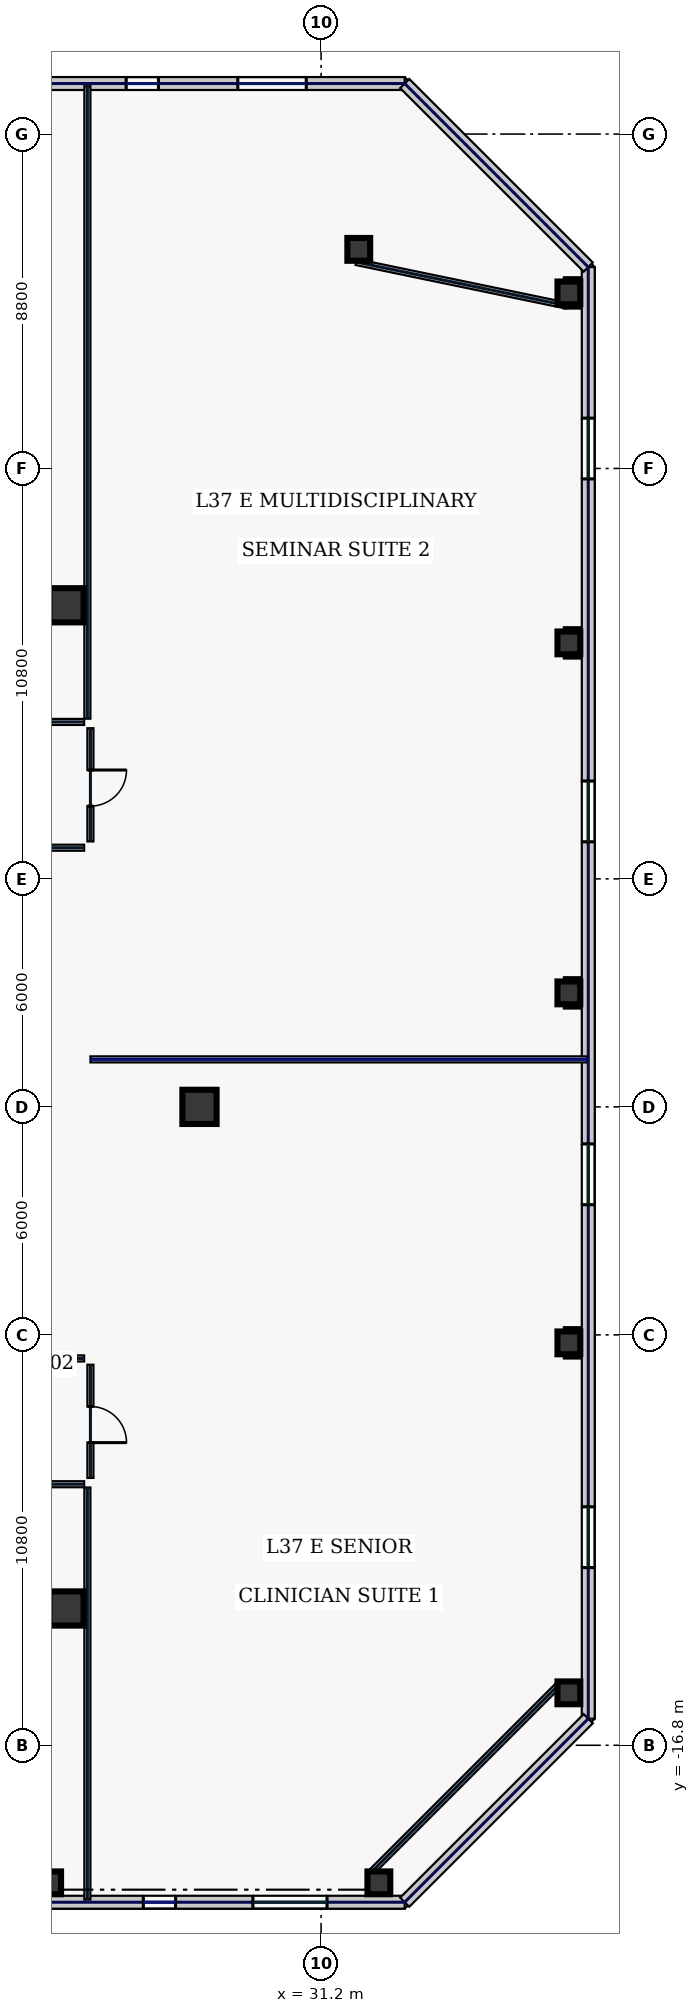
"""IFC4 building model, lengths in metres.
Left out: names, types, materials, properties, quantities, classifications, styles, units other than length and angle.
Written with IfcOpenShell. Run it as: python <this file> out.ifc"""

import sys

from ifc_helpers import new_model, si_unit, direction, frame, frame_2d, origin, origin_2d, place, context, subcontext, project, spatial, rectangle, hollow_rectangle, extrude, element, fill, save


model = new_model("IFC4")
c1 = context("Model", 3, precision=1e-05, world=origin(), true_north=direction((0.0, 1.0)))
c2 = subcontext(c1, "Body", "Model", "MODEL_VIEW")
j1 = project(units=[si_unit("LENGTHUNIT", "METRE"), si_unit("PLANEANGLEUNIT", "RADIAN")], contexts=[c1])
p1 = place(None, origin())
s1 = spatial("IfcSite", under=j1, at=p1, CompositionType="ELEMENT")
p2 = place(p1, origin())
s2 = spatial("IfcBuilding", under=s1, at=p2, CompositionType="ELEMENT")
p3 = place(p2, frame((0.0, 0.0, 164.2)))
s3 = spatial("IfcBuildingStorey", under=s2, at=p3, CompositionType="ELEMENT", Elevation=164.2)
for number, where, z_axis, x_axis in (
    (1, (24.5, -13.2, 0.0), (0.0, 0.0, 1.0), (1.0, 0.0, 0.0)),
    (2, (24.5, 13.2, 0.0), (0.0, 0.0, 1.0), (1.0, 0.0, 0.0)),
    (3, (28.0, 0.0, 0.0), (0.0, 0.0, 1.0), (1.0, 0.0, 0.0)),
):
    element("IfcColumn", number, at=place(p3, frame(where, z_axis=z_axis, x_axis=x_axis)), inside=s3, PredefinedType="COLUMN", context=c2, shape_type="SweptSolid", body=[
        extrude(hollow_rectangle(XDim=0.9, YDim=0.9, WallThickness=0.04, at=origin_2d()), origin(), (0.0, 0.0, 1.0), 3.74),
    ])
for number, where, z_axis, x_axis in (
    (4, (24.057, -20.42, 0.0), (0.0, 0.0, 1.0), (1.0, 0.0, 0.0)),
    (5, (32.72, -20.42, 0.0), (0.0, 0.0, 1.0), (1.0, 0.0, 0.0)),
    (6, (32.191, 22.566, 0.0), (0.0, 0.0, 1.0), (1.0, 0.0, 0.0)),
    (7, (37.72, -15.42, 0.0), (0.0, 0.0, 1.0), (1.0, 0.0, 0.0)),
    (8, (37.72, -6.21, 0.0), (0.0, 0.0, 1.0), (1.0, 0.0, 0.0)),
    (9, (37.72, 3.0, 0.0), (0.0, 0.0, 1.0), (1.0, 0.0, 0.0)),
    (10, (37.72, 12.21, 0.0), (0.0, 0.0, 1.0), (1.0, 0.0, 0.0)),
    (11, (37.72, 21.42, 0.0), (0.0, 0.0, 1.0), (1.0, 0.0, 0.0)),
):
    element("IfcColumn", number, at=place(p3, frame(where, z_axis=z_axis, x_axis=x_axis)), inside=s3, PredefinedType="COLUMN", context=c2, shape_type="SweptSolid", body=[
        extrude(hollow_rectangle(XDim=0.6, YDim=0.6, WallThickness=0.028, at=origin_2d()), origin(), (0.0, 0.0, 1.0), 3.74),
    ])
p4 = place(p3, frame((13.463, -20.93, 0.0), z_axis=(0.0, 0.0, 1.0), x_axis=(1.0, 0.0, 0.0)))
e12 = element("IfcWall", 12, at=p4, inside=s3, PredefinedType="STANDARD", context=c2, shape_type="SweptSolid", body=[
    extrude(rectangle(XDim=19.937, YDim=0.34, at=frame_2d((9.969, 0.0))), origin(), (0.0, 0.0, 1.0), 3.74),
])
p5 = place(p4, frame((3.295, 0.0, 0.8)))
e13 = element("IfcOpeningElement", 13, at=p5, cuts=e12, PredefinedType="OPENING", context=c2, shape_type="SweptSolid", body=[
    extrude(rectangle(XDim=1.95, YDim=2.1, at=frame_2d((0.975, 1.05))), frame((0.0, 0.18, 0.0), z_axis=(0.0, -1.0, 0.0), x_axis=(1.0, 0.0, 0.0)), (0.0, 0.0, 1.0), 0.36),
])
p6 = place(p4, frame((8.38, 0.0, 0.8)))
e14 = element("IfcOpeningElement", 14, at=p6, cuts=e12, PredefinedType="OPENING", context=c2, shape_type="SweptSolid", body=[
    extrude(rectangle(XDim=0.85, YDim=1.85, at=frame_2d((0.425, 0.925))), frame((0.0, 0.18, 0.0), z_axis=(0.0, -1.0, 0.0), x_axis=(1.0, 0.0, 0.0)), (0.0, 0.0, 1.0), 0.36),
])
p7 = place(p4, frame((13.058, 0.0, 0.8)))
e15 = element("IfcOpeningElement", 15, at=p7, cuts=e12, PredefinedType="OPENING", context=c2, shape_type="SweptSolid", body=[
    extrude(rectangle(XDim=0.85, YDim=1.85, at=frame_2d((0.425, 0.925))), frame((0.0, 0.18, 0.0), z_axis=(0.0, -1.0, 0.0), x_axis=(1.0, 0.0, 0.0)), (0.0, 0.0, 1.0), 0.36),
])
p8 = place(p4, frame((15.943, 0.0, 0.8)))
e16 = element("IfcOpeningElement", 16, at=p8, cuts=e12, PredefinedType="OPENING", context=c2, shape_type="SweptSolid", body=[
    extrude(rectangle(XDim=1.95, YDim=2.1, at=frame_2d((0.975, 1.05))), frame((0.0, 0.18, 0.0), z_axis=(0.0, -1.0, 0.0), x_axis=(1.0, 0.0, 0.0)), (0.0, 0.0, 1.0), 0.36),
])
p9 = place(p3, frame((33.4, 26.93, 0.0), z_axis=(0.0, 0.0, 1.0), x_axis=(-1.0, 0.0, 0.0)))
e17 = element("IfcWall", 17, at=p9, inside=s3, PredefinedType="STANDARD", context=c2, shape_type="SweptSolid", body=[
    extrude(rectangle(XDim=20.09, YDim=0.34, at=frame_2d((10.045, 0.0))), origin(), (0.0, 0.0, 1.0), 3.74),
])
p10 = place(p9, frame((15.105, 0.0, 0.22)))
e18 = element("IfcOpeningElement", 18, at=p10, cuts=e17, PredefinedType="OPENING", context=c2, shape_type="SweptSolid", body=[
    extrude(rectangle(XDim=1.6, YDim=1.2, at=frame_2d((0.8, 0.6))), frame((0.0, 0.18, 0.0), z_axis=(0.0, -1.0, 0.0), x_axis=(1.0, 0.0, 0.0)), (0.0, 0.0, 1.0), 0.36),
])
p11 = place(p9, frame((11.071, 0.0, 0.7)))
e19 = element("IfcOpeningElement", 19, at=p11, cuts=e17, PredefinedType="OPENING", context=c2, shape_type="SweptSolid", body=[
    extrude(rectangle(XDim=1.8, YDim=2.2, at=frame_2d((0.9, 1.1))), frame((0.0, 0.18, 0.0), z_axis=(0.0, -1.0, 0.0), x_axis=(1.0, 0.0, 0.0)), (0.0, 0.0, 1.0), 0.36),
])
p12 = place(p9, frame((6.48, 0.0, 0.7)))
e20 = element("IfcOpeningElement", 20, at=p12, cuts=e17, PredefinedType="OPENING", context=c2, shape_type="SweptSolid", body=[
    extrude(rectangle(XDim=0.85, YDim=1.85, at=frame_2d((0.425, 0.925))), frame((0.0, 0.18, 0.0), z_axis=(0.0, -1.0, 0.0), x_axis=(1.0, 0.0, 0.0)), (0.0, 0.0, 1.0), 0.36),
])
p13 = place(p9, frame((2.591, 0.0, 0.7)))
e21 = element("IfcOpeningElement", 21, at=p13, cuts=e17, PredefinedType="OPENING", context=c2, shape_type="SweptSolid", body=[
    extrude(rectangle(XDim=1.8, YDim=2.2, at=frame_2d((0.9, 1.1))), frame((0.0, 0.18, 0.0), z_axis=(0.0, -1.0, 0.0), x_axis=(1.0, 0.0, 0.0)), (0.0, 0.0, 1.0), 0.36),
])
p14 = place(p3, frame((38.23, -16.1, 0.0), z_axis=(0.0, 0.0, 1.0), x_axis=(0.0, 1.0, 0.0)))
e22 = element("IfcWall", 22, at=p14, inside=s3, PredefinedType="STANDARD", context=c2, shape_type="SweptSolid", body=[
    extrude(rectangle(XDim=38.2, YDim=0.34, at=frame_2d((19.1, 0.0))), origin(), (0.0, 0.0, 1.0), 3.74),
])
p15 = place(p14, frame((3.975, 0.0, 0.58)))
e23 = element("IfcOpeningElement", 23, at=p15, cuts=e22, PredefinedType="OPENING", context=c2, shape_type="SweptSolid", body=[
    extrude(rectangle(XDim=1.6, YDim=2.3, at=frame_2d((0.8, 1.15))), frame((0.0, 0.18, 0.0), z_axis=(0.0, -1.0, 0.0), x_axis=(1.0, 0.0, 0.0)), (0.0, 0.0, 1.0), 0.36),
])
p16 = place(p14, frame((13.525, 0.0, 0.58)))
e24 = element("IfcOpeningElement", 24, at=p16, cuts=e22, PredefinedType="OPENING", context=c2, shape_type="SweptSolid", body=[
    extrude(rectangle(XDim=1.6, YDim=2.3, at=frame_2d((0.8, 1.15))), frame((0.0, 0.18, 0.0), z_axis=(0.0, -1.0, 0.0), x_axis=(1.0, 0.0, 0.0)), (0.0, 0.0, 1.0), 0.36),
])
p17 = place(p14, frame((23.075, 0.0, 0.58)))
e25 = element("IfcOpeningElement", 25, at=p17, cuts=e22, PredefinedType="OPENING", context=c2, shape_type="SweptSolid", body=[
    extrude(rectangle(XDim=1.6, YDim=2.3, at=frame_2d((0.8, 1.15))), frame((0.0, 0.18, 0.0), z_axis=(0.0, -1.0, 0.0), x_axis=(1.0, 0.0, 0.0)), (0.0, 0.0, 1.0), 0.36),
])
p18 = place(p14, frame((32.625, 0.0, 0.58)))
e26 = element("IfcOpeningElement", 26, at=p18, cuts=e22, PredefinedType="OPENING", context=c2, shape_type="SweptSolid", body=[
    extrude(rectangle(XDim=1.6, YDim=2.3, at=frame_2d((0.8, 1.15))), frame((0.0, 0.18, 0.0), z_axis=(0.0, -1.0, 0.0), x_axis=(1.0, 0.0, 0.0)), (0.0, 0.0, 1.0), 0.36),
])
for number, where, z_axis, x_axis in (
    (27, (33.4, -20.93, 0.0), (0.0, 0.0, 1.0), (0.707, 0.707, 0.0)),
    (28, (38.23, 22.1, 0.0), (0.0, 0.0, 1.0), (-0.707, 0.707, 0.0)),
):
    element("IfcWall", number, at=place(p3, frame(where, z_axis=z_axis, x_axis=x_axis)), inside=s3, PredefinedType="STANDARD", context=c2, shape_type="SweptSolid", body=[
        extrude(rectangle(XDim=6.831, YDim=0.34, at=frame_2d((3.415, 0.0))), origin(), (0.0, 0.0, 1.0), 3.74),
    ])
p19 = place(p3, frame((32.479, -20.18, 0.0), z_axis=(0.0, 0.0, 1.0), x_axis=(0.707106781187, 0.707106781187, 0.0)))
e29 = element("IfcWall", 29, at=p19, inside=s3, PredefinedType="PARTITIONING", context=c2, shape_type="SweptSolid", body=[
    extrude(rectangle(XDim=7.071, YDim=0.16, at=frame_2d((3.536, 0.0))), origin(), (0.0, 0.0, 1.0), 3.74),
])
p20 = place(p3, frame((37.651, 21.087, 0.0), z_axis=(0.0, 0.0, 1.0), x_axis=(-0.979184618318, 0.202971631636, 0.0)))
e30 = element("IfcWall", 30, at=p20, inside=s3, PredefinedType="PARTITIONING", context=c2, shape_type="SweptSolid", body=[
    extrude(rectangle(XDim=5.646, YDim=0.16, at=frame_2d((2.823, 0.0))), origin(), (0.0, 0.0, 1.0), 3.74),
])
p21 = place(p3, frame((-24.965, 10.13, 0.0), z_axis=(0.0, 0.0, 1.0), x_axis=(1.0, 0.0, 0.0)))
e31 = element("IfcWall", 31, at=p21, inside=s3, PredefinedType="PARTITIONING", context=c2, shape_type="SweptSolid", body=[
    extrude(rectangle(XDim=49.93, YDim=0.16, at=frame_2d((24.965, 0.0))), origin(), (0.0, 0.0, 1.0), 3.74),
])
p22 = place(p21, frame((4.044, 0.0, 0.0)))
e32 = element("IfcOpeningElement", 32, at=p22, cuts=e31, PredefinedType="OPENING", context=c2, shape_type="SweptSolid", body=[
    extrude(rectangle(XDim=0.95, YDim=2.2, at=frame_2d((0.475, 1.1))), frame((0.0, 0.09, 0.0), z_axis=(0.0, -1.0, 0.0), x_axis=(1.0, 0.0, 0.0)), (0.0, 0.0, 1.0), 0.18),
])
p23 = place(p21, frame((11.9, 0.0, 0.0)))
e33 = element("IfcOpeningElement", 33, at=p23, cuts=e31, PredefinedType="OPENING", context=c2, shape_type="SweptSolid", body=[
    extrude(rectangle(XDim=1.15, YDim=2.2, at=frame_2d((0.575, 1.1))), frame((0.0, 0.09, 0.0), z_axis=(0.0, -1.0, 0.0), x_axis=(1.0, 0.0, 0.0)), (0.0, 0.0, 1.0), 0.18),
])
p24 = place(p21, frame((18.9, 0.0, 0.0)))
e34 = element("IfcOpeningElement", 34, at=p24, cuts=e31, PredefinedType="OPENING", context=c2, shape_type="SweptSolid", body=[
    extrude(rectangle(XDim=1.05, YDim=2.2, at=frame_2d((0.525, 1.1))), frame((0.0, 0.09, 0.0), z_axis=(0.0, -1.0, 0.0), x_axis=(1.0, 0.0, 0.0)), (0.0, 0.0, 1.0), 0.18),
])
p25 = place(p21, frame((27.03, 0.0, 0.0)))
e35 = element("IfcOpeningElement", 35, at=p25, cuts=e31, PredefinedType="OPENING", context=c2, shape_type="SweptSolid", body=[
    extrude(rectangle(XDim=0.95, YDim=2.2, at=frame_2d((0.475, 1.1))), frame((0.0, 0.09, 0.0), z_axis=(0.0, -1.0, 0.0), x_axis=(1.0, 0.0, 0.0)), (0.0, 0.0, 1.0), 0.18),
])
p26 = place(p21, frame((36.29, 0.0, 0.0)))
e36 = element("IfcOpeningElement", 36, at=p26, cuts=e31, PredefinedType="OPENING", context=c2, shape_type="SweptSolid", body=[
    extrude(rectangle(XDim=0.95, YDim=2.2, at=frame_2d((0.475, 1.1))), frame((0.0, 0.09, 0.0), z_axis=(0.0, -1.0, 0.0), x_axis=(1.0, 0.0, 0.0)), (0.0, 0.0, 1.0), 0.18),
])
p27 = place(p21, frame((44.966, 0.0, 0.0)))
e37 = element("IfcOpeningElement", 37, at=p27, cuts=e31, PredefinedType="OPENING", context=c2, shape_type="SweptSolid", body=[
    extrude(rectangle(XDim=0.95, YDim=2.2, at=frame_2d((0.475, 1.1))), frame((0.0, 0.09, 0.0), z_axis=(0.0, -1.0, 0.0), x_axis=(1.0, 0.0, 0.0)), (0.0, 0.0, 1.0), 0.18),
])
p28 = place(p3, frame((25.13, 9.965, 0.0), z_axis=(0.0, 0.0, 1.0), x_axis=(0.0, -1.0, 0.0)))
e38 = element("IfcWall", 38, at=p28, inside=s3, PredefinedType="PARTITIONING", context=c2, shape_type="SweptSolid", body=[
    extrude(rectangle(XDim=2.98, YDim=0.16, at=frame_2d((1.49, 0.0))), origin(), (0.0, 0.0, 1.0), 3.74),
])
p29 = place(p28, frame((1.1, 0.0, 0.0)))
e39 = element("IfcOpeningElement", 39, at=p29, cuts=e38, PredefinedType="OPENING", context=c2, shape_type="SweptSolid", body=[
    extrude(rectangle(XDim=0.95, YDim=2.2, at=frame_2d((0.475, 1.1))), frame((0.0, 0.09, 0.0), z_axis=(0.0, -1.0, 0.0), x_axis=(1.0, 0.0, 0.0)), (0.0, 0.0, 1.0), 0.18),
])
for number, where, z_axis, x_axis in (
    (40, (24.965, 6.82, 0.0), (0.0, 0.0, 1.0), (-1.0, 0.0, 0.0)),
    (41, (10.63, -6.62, 0.0), (0.0, 0.0, 1.0), (1.0, 0.0, 0.0)),
):
    element("IfcWall", number, at=place(p3, frame(where, z_axis=z_axis, x_axis=x_axis)), inside=s3, PredefinedType="PARTITIONING", context=c2, shape_type="SweptSolid", body=[
        extrude(rectangle(XDim=14.335, YDim=0.16, at=frame_2d((7.167, 0.0))), origin(), (0.0, 0.0, 1.0), 3.74),
    ])
p30 = place(p3, frame((25.13, -6.785, 0.0), z_axis=(0.0, 0.0, 1.0), x_axis=(0.0, -1.0, 0.0)))
e42 = element("IfcWall", 42, at=p30, inside=s3, PredefinedType="PARTITIONING", context=c2, shape_type="SweptSolid", body=[
    extrude(rectangle(XDim=2.98, YDim=0.16, at=frame_2d((1.49, 0.0))), origin(), (0.0, 0.0, 1.0), 3.74),
])
p31 = place(p30, frame((1.1, 0.0, 0.0)))
e43 = element("IfcOpeningElement", 43, at=p31, cuts=e42, PredefinedType="OPENING", context=c2, shape_type="SweptSolid", body=[
    extrude(rectangle(XDim=0.95, YDim=2.2, at=frame_2d((0.475, 1.1))), frame((0.0, 0.09, 0.0), z_axis=(0.0, -1.0, 0.0), x_axis=(1.0, 0.0, 0.0)), (0.0, 0.0, 1.0), 0.18),
])
p32 = place(p3, frame((24.965, -9.93, 0.0), z_axis=(0.0, 0.0, 1.0), x_axis=(-1.0, 0.0, 0.0)))
e44 = element("IfcWall", 44, at=p32, inside=s3, PredefinedType="PARTITIONING", context=c2, shape_type="SweptSolid", body=[
    extrude(rectangle(XDim=49.93, YDim=0.16, at=frame_2d((24.965, 0.0))), origin(), (0.0, 0.0, 1.0), 3.74),
])
p33 = place(p32, frame((47.106, 0.0, 0.0)))
e45 = element("IfcOpeningElement", 45, at=p33, cuts=e44, PredefinedType="OPENING", context=c2, shape_type="SweptSolid", body=[
    extrude(rectangle(XDim=0.95, YDim=2.2, at=frame_2d((0.475, 1.1))), frame((0.0, 0.09, 0.0), z_axis=(0.0, -1.0, 0.0), x_axis=(1.0, 0.0, 0.0)), (0.0, 0.0, 1.0), 0.18),
])
p34 = place(p32, frame((42.355, 0.0, 0.0)))
e46 = element("IfcOpeningElement", 46, at=p34, cuts=e44, PredefinedType="OPENING", context=c2, shape_type="SweptSolid", body=[
    extrude(rectangle(XDim=1.05, YDim=2.2, at=frame_2d((0.525, 1.1))), frame((0.0, 0.09, 0.0), z_axis=(0.0, -1.0, 0.0), x_axis=(1.0, 0.0, 0.0)), (0.0, 0.0, 1.0), 0.18),
])
p35 = place(p32, frame((33.93, 0.0, 0.0)))
e47 = element("IfcOpeningElement", 47, at=p35, cuts=e44, PredefinedType="OPENING", context=c2, shape_type="SweptSolid", body=[
    extrude(rectangle(XDim=1.15, YDim=2.2, at=frame_2d((0.575, 1.1))), frame((0.0, 0.09, 0.0), z_axis=(0.0, -1.0, 0.0), x_axis=(1.0, 0.0, 0.0)), (0.0, 0.0, 1.0), 0.18),
])
p36 = place(p32, frame((24.45, 0.0, 0.0)))
e48 = element("IfcOpeningElement", 48, at=p36, cuts=e44, PredefinedType="OPENING", context=c2, shape_type="SweptSolid", body=[
    extrude(rectangle(XDim=0.95, YDim=2.2, at=frame_2d((0.475, 1.1))), frame((0.0, 0.09, 0.0), z_axis=(0.0, -1.0, 0.0), x_axis=(1.0, 0.0, 0.0)), (0.0, 0.0, 1.0), 0.18),
])
p37 = place(p32, frame((15.875, 0.0, 0.0)))
e49 = element("IfcOpeningElement", 49, at=p37, cuts=e44, PredefinedType="OPENING", context=c2, shape_type="SweptSolid", body=[
    extrude(rectangle(XDim=0.95, YDim=2.2, at=frame_2d((0.475, 1.1))), frame((0.0, 0.09, 0.0), z_axis=(0.0, -1.0, 0.0), x_axis=(1.0, 0.0, 0.0)), (0.0, 0.0, 1.0), 0.18),
])
p38 = place(p32, frame((7.575, 0.0, 0.0)))
e50 = element("IfcOpeningElement", 50, at=p38, cuts=e44, PredefinedType="OPENING", context=c2, shape_type="SweptSolid", body=[
    extrude(rectangle(XDim=0.95, YDim=2.2, at=frame_2d((0.475, 1.1))), frame((0.0, 0.09, 0.0), z_axis=(0.0, -1.0, 0.0), x_axis=(1.0, 0.0, 0.0)), (0.0, 0.0, 1.0), 0.18),
])
p39 = place(p32, frame((2.044, 0.0, 0.0)))
e51 = element("IfcOpeningElement", 51, at=p39, cuts=e44, PredefinedType="OPENING", context=c2, shape_type="SweptSolid", body=[
    extrude(rectangle(XDim=1.05, YDim=2.2, at=frame_2d((0.525, 1.1))), frame((0.0, 0.09, 0.0), z_axis=(0.0, -1.0, 0.0), x_axis=(1.0, 0.0, 0.0)), (0.0, 0.0, 1.0), 0.18),
])
p40 = place(p3, frame((25.05, 10.215, 0.0), z_axis=(0.0, 0.0, 1.0), x_axis=(0.0, 1.0, 0.0)))
e52 = element("IfcWall", 52, at=p40, inside=s3, PredefinedType="PARTITIONING", context=c2, shape_type="SweptSolid", body=[
    extrude(rectangle(XDim=16.645, YDim=0.16, at=frame_2d((8.323, 0.0))), origin(), (0.0, 0.0, 1.0), 3.74),
])
p41 = place(p3, frame((25.05, -20.86, 0.0), z_axis=(0.0, 0.0, 1.0), x_axis=(0.0, 1.0, 0.0)))
e53 = element("IfcWall", 53, at=p41, inside=s3, PredefinedType="PARTITIONING", context=c2, shape_type="SweptSolid", body=[
    extrude(rectangle(XDim=10.845, YDim=0.16, at=frame_2d((5.423, 0.0))), origin(), (0.0, 0.0, 1.0), 3.74),
])
p42 = place(p3, frame((25.13, 1.25, 0.0), z_axis=(0.0, 0.0, 1.0), x_axis=(1.0, 0.0, 0.0)))
e54 = element("IfcWall", 54, at=p42, inside=s3, PredefinedType="PARTITIONING", context=c2, shape_type="SweptSolid", body=[
    extrude(rectangle(XDim=13.08, YDim=0.16, at=frame_2d((6.54, 0.0))), origin(), (0.0, 0.0, 1.0), 3.285),
])
p43 = place(p7, origin())
e55 = element("IfcWindow", 55, at=p43, inside=s3, PartitioningType="SINGLE_PANEL", PredefinedType="WINDOW", context=c2, shape_type="SweptSolid", body=[
    extrude(rectangle(XDim=0.85, YDim=1.85, at=frame_2d((0.425, 0.925))), frame((0.0, 0.03, 0.0), z_axis=(0.0, -1.0, 0.0), x_axis=(1.0, 0.0, 0.0)), (0.0, 0.0, 1.0), 0.06),
])
fill(e15, e55)
p44 = place(p8, origin())
e56 = element("IfcWindow", 56, at=p44, inside=s3, PartitioningType="SINGLE_PANEL", PredefinedType="WINDOW", context=c2, shape_type="SweptSolid", body=[
    extrude(rectangle(XDim=1.95, YDim=2.1, at=frame_2d((0.975, 1.05))), frame((0.0, 0.03, 0.0), z_axis=(0.0, -1.0, 0.0), x_axis=(1.0, 0.0, 0.0)), (0.0, 0.0, 1.0), 0.06),
])
fill(e16, e56)
p45 = place(p12, origin())
e57 = element("IfcWindow", 57, at=p45, inside=s3, PartitioningType="SINGLE_PANEL", PredefinedType="WINDOW", context=c2, shape_type="SweptSolid", body=[
    extrude(rectangle(XDim=0.85, YDim=1.85, at=frame_2d((0.425, 0.925))), frame((0.0, 0.03, 0.0), z_axis=(0.0, -1.0, 0.0), x_axis=(1.0, 0.0, 0.0)), (0.0, 0.0, 1.0), 0.06),
])
fill(e20, e57)
p46 = place(p13, origin())
e58 = element("IfcWindow", 58, at=p46, inside=s3, PartitioningType="SINGLE_PANEL", PredefinedType="WINDOW", context=c2, shape_type="SweptSolid", body=[
    extrude(rectangle(XDim=1.8, YDim=2.2, at=frame_2d((0.9, 1.1))), frame((0.0, 0.03, 0.0), z_axis=(0.0, -1.0, 0.0), x_axis=(1.0, 0.0, 0.0)), (0.0, 0.0, 1.0), 0.06),
])
fill(e21, e58)
p47 = place(p15, origin())
e59 = element("IfcWindow", 59, at=p47, inside=s3, PartitioningType="SINGLE_PANEL", PredefinedType="WINDOW", context=c2, shape_type="SweptSolid", body=[
    extrude(rectangle(XDim=1.6, YDim=2.3, at=frame_2d((0.8, 1.15))), frame((0.0, 0.03, 0.0), z_axis=(0.0, -1.0, 0.0), x_axis=(1.0, 0.0, 0.0)), (0.0, 0.0, 1.0), 0.06),
])
fill(e23, e59)
p48 = place(p16, origin())
e60 = element("IfcWindow", 60, at=p48, inside=s3, PartitioningType="SINGLE_PANEL", PredefinedType="WINDOW", context=c2, shape_type="SweptSolid", body=[
    extrude(rectangle(XDim=1.6, YDim=2.3, at=frame_2d((0.8, 1.15))), frame((0.0, 0.03, 0.0), z_axis=(0.0, -1.0, 0.0), x_axis=(1.0, 0.0, 0.0)), (0.0, 0.0, 1.0), 0.06),
])
fill(e24, e60)
p49 = place(p17, origin())
e61 = element("IfcWindow", 61, at=p49, inside=s3, PartitioningType="SINGLE_PANEL", PredefinedType="WINDOW", context=c2, shape_type="SweptSolid", body=[
    extrude(rectangle(XDim=1.6, YDim=2.3, at=frame_2d((0.8, 1.15))), frame((0.0, 0.03, 0.0), z_axis=(0.0, -1.0, 0.0), x_axis=(1.0, 0.0, 0.0)), (0.0, 0.0, 1.0), 0.06),
])
fill(e25, e61)
p50 = place(p18, origin())
e62 = element("IfcWindow", 62, at=p50, inside=s3, PartitioningType="SINGLE_PANEL", PredefinedType="WINDOW", context=c2, shape_type="SweptSolid", body=[
    extrude(rectangle(XDim=1.6, YDim=2.3, at=frame_2d((0.8, 1.15))), frame((0.0, 0.03, 0.0), z_axis=(0.0, -1.0, 0.0), x_axis=(1.0, 0.0, 0.0)), (0.0, 0.0, 1.0), 0.06),
])
fill(e26, e62)
p51 = place(p31, origin())
e63 = element("IfcDoor", 63, at=p51, inside=s3, OperationType="SINGLE_SWING_RIGHT", PredefinedType="DOOR", context=c2, shape_type="SweptSolid", body=[
    extrude(rectangle(XDim=0.95, YDim=2.2, at=frame_2d((0.475, 1.1))), frame((0.0, 0.025, 0.0), z_axis=(0.0, -1.0, 0.0), x_axis=(1.0, 0.0, 0.0)), (0.0, 0.0, 1.0), 0.05),
])
fill(e43, e63)
p52 = place(p29, origin())
e64 = element("IfcDoor", 64, at=p52, inside=s3, OperationType="SINGLE_SWING_LEFT", PredefinedType="DOOR", context=c2, shape_type="SweptSolid", body=[
    extrude(rectangle(XDim=0.95, YDim=2.2, at=frame_2d((0.475, 1.1))), frame((0.0, 0.025, 0.0), z_axis=(0.0, -1.0, 0.0), x_axis=(1.0, 0.0, 0.0)), (0.0, 0.0, 1.0), 0.05),
])
fill(e39, e64)
save(model, sys.argv[1])
